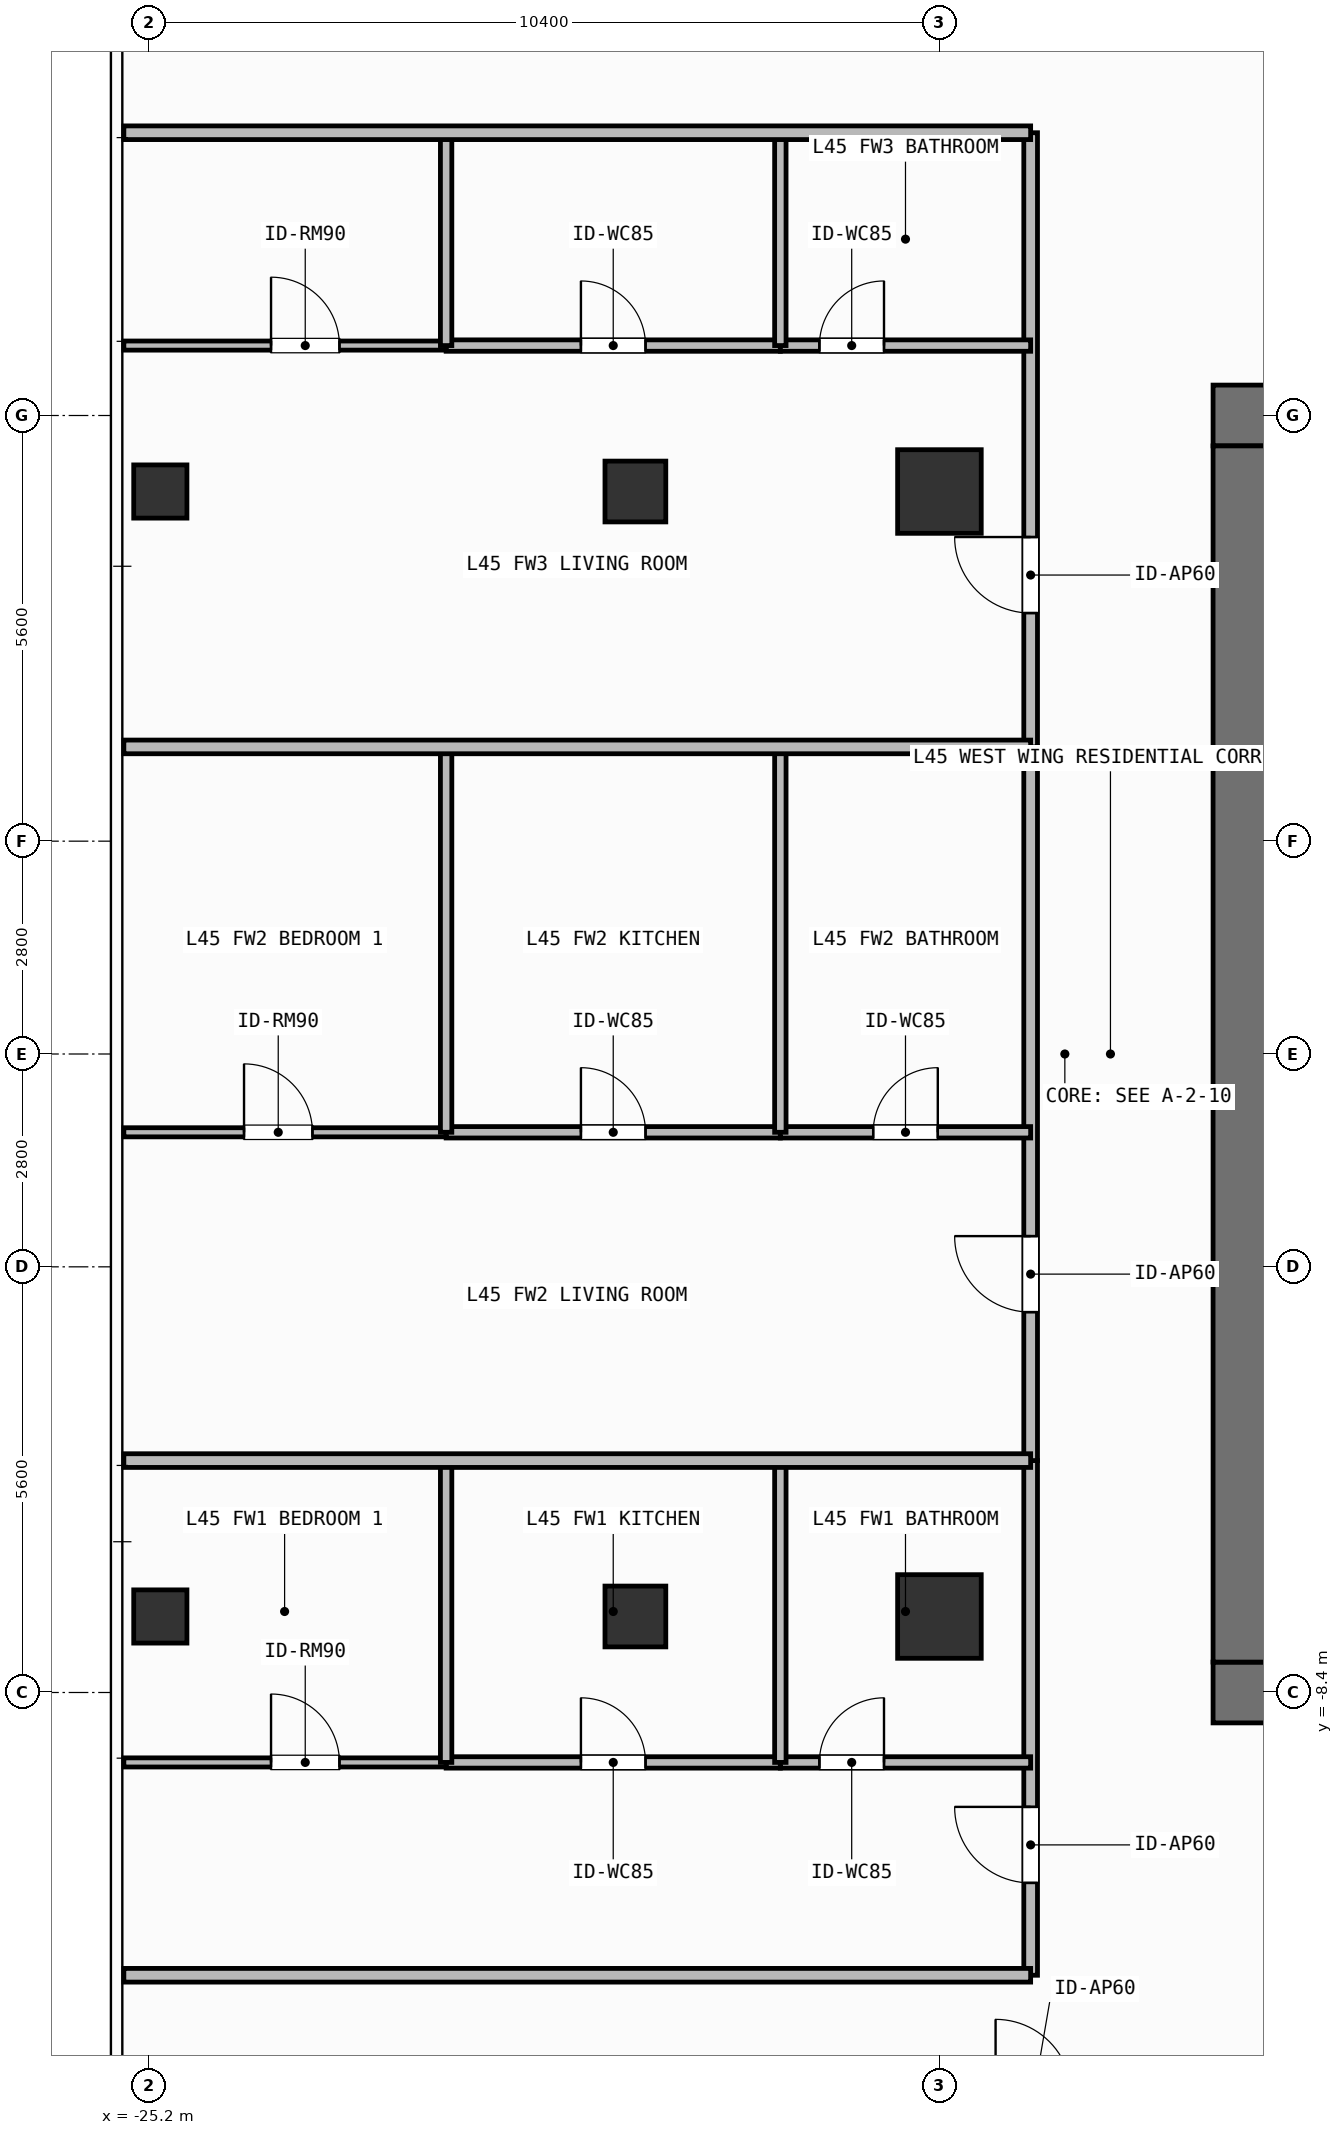
"""IFC4 building model, lengths in metres.
Left out: names, types, materials, properties, quantities, classifications, styles, units other than length and angle.
Written with IfcOpenShell. Run it as: python <this file> out.ifc"""

import sys

from ifc_helpers import new_model, si_unit, direction, frame, frame_2d, origin, origin_2d, place, context, subcontext, project, spatial, rectangle, hollow_rectangle, extrude, element, fill, save


model = new_model("IFC4")
c1 = context("Model", 3, precision=1e-05, world=origin(), true_north=direction((0.0, 1.0)))
c2 = subcontext(c1, "Body", "Model", "MODEL_VIEW")
j1 = project(units=[si_unit("LENGTHUNIT", "METRE"), si_unit("PLANEANGLEUNIT", "RADIAN")], contexts=[c1])
p1 = place(None, origin())
s1 = spatial("IfcSite", under=j1, at=p1, CompositionType="ELEMENT")
p2 = place(p1, origin())
s2 = spatial("IfcBuilding", under=s1, at=p2, CompositionType="ELEMENT")
p3 = place(p2, frame((0.0, 0.0, 183.6)))
s3 = spatial("IfcBuildingStorey", under=s2, at=p3, CompositionType="ELEMENT", Elevation=183.6)
for number, where, z_axis, x_axis in (
    (1, (-11.2, -8.4, 0.0), (0.0, 0.0, 1.0), (1.0, 0.0, 0.0)),
    (2, (-11.2, 8.4, 0.0), (0.0, 0.0, 1.0), (1.0, 0.0, 0.0)),
):
    element("IfcWall", number, at=place(p3, frame(where, z_axis=z_axis, x_axis=x_axis)), inside=s3, PredefinedType="SHEAR", context=c2, shape_type="SweptSolid", body=[
        extrude(rectangle(XDim=1.5, YDim=0.8, at=frame_2d((0.75, 0.0))), origin(), (0.0, 0.0, 1.0), 3.9),
    ])
p4 = place(p3, frame((-10.8, -8.0, 0.0), z_axis=(0.0, 0.0, 1.0), x_axis=(0.0, 1.0, 0.0)))
e3 = element("IfcWall", 3, at=p4, inside=s3, PredefinedType="SHEAR", context=c2, shape_type="SweptSolid", body=[
    extrude(rectangle(XDim=16.0, YDim=0.8, at=frame_2d((8.0, 0.0))), origin(), (0.0, 0.0, 1.0), 3.9),
])
for number, where, z_axis, x_axis in (
    (4, (-14.8, -7.4, 0.0), (0.0, 0.0, 1.0), (1.0, 0.0, 0.0)),
    (5, (-14.8, 7.4, 0.0), (0.0, 0.0, 1.0), (1.0, 0.0, 0.0)),
):
    element("IfcColumn", number, at=place(p3, frame(where, z_axis=z_axis, x_axis=x_axis)), inside=s3, PredefinedType="COLUMN", context=c2, shape_type="SweptSolid", body=[
        extrude(rectangle(XDim=1.1, YDim=1.1, at=origin_2d()), origin(), (0.0, 0.0, 1.0), 3.9),
    ])
for number, where, z_axis, x_axis in (
    (6, (-18.8, -7.4, 0.0), (0.0, 0.0, 1.0), (1.0, 0.0, 0.0)),
    (7, (-18.8, 7.4, 0.0), (0.0, 0.0, 1.0), (1.0, 0.0, 0.0)),
):
    element("IfcColumn", number, at=place(p3, frame(where, z_axis=z_axis, x_axis=x_axis)), inside=s3, PredefinedType="COLUMN", context=c2, shape_type="SweptSolid", body=[
        extrude(hollow_rectangle(XDim=0.8, YDim=0.8, WallThickness=0.036, at=origin_2d()), origin(), (0.0, 0.0, 1.0), 3.9),
    ])
for number, where, z_axis, x_axis in (
    (8, (-25.05, -7.4, 0.0), (0.0, 0.0, 1.0), (1.0, 0.0, 0.0)),
    (9, (-25.05, 7.4, 0.0), (0.0, 0.0, 1.0), (1.0, 0.0, 0.0)),
):
    element("IfcColumn", number, at=place(p3, frame(where, z_axis=z_axis, x_axis=x_axis)), inside=s3, PredefinedType="COLUMN", context=c2, shape_type="SweptSolid", body=[
        extrude(hollow_rectangle(XDim=0.7, YDim=0.7, WallThickness=0.032, at=origin_2d()), origin(), (0.0, 0.0, 1.0), 3.9),
    ])
p5 = place(p3, frame((-13.6, -12.12, 0.0), z_axis=(0.0, 0.0, 1.0), x_axis=(0.0, 1.0, 0.0)))
e10 = element("IfcWall", 10, at=p5, inside=s3, PredefinedType="PARTITIONING", context=c2, shape_type="SweptSolid", body=[
    extrude(rectangle(XDim=6.771, YDim=0.18, at=frame_2d((3.385, 0.0))), origin(), (0.0, 0.0, 1.0), 3.68),
])
p6 = place(p5, frame((1.215, 0.0, 0.0)))
e11 = element("IfcOpeningElement", 11, at=p6, cuts=e10, PredefinedType="OPENING", context=c2, shape_type="SweptSolid", body=[
    extrude(rectangle(XDim=1.0, YDim=2.2, at=frame_2d((0.5, 1.1))), frame((0.0, 0.1, 0.0), z_axis=(0.0, -1.0, 0.0), x_axis=(1.0, 0.0, 0.0)), (0.0, 0.0, 1.0), 0.2),
])
p7 = place(p3, frame((-21.29, -9.32, 0.0), z_axis=(0.0, 0.0, 1.0), x_axis=(1.0, 0.0, 0.0)))
e12 = element("IfcWall", 12, at=p7, inside=s3, PredefinedType="PARTITIONING", context=c2, shape_type="SweptSolid", body=[
    extrude(rectangle(XDim=4.397, YDim=0.15, at=frame_2d((2.198, 0.0))), origin(), (0.0, 0.0, 1.0), 3.68),
])
p8 = place(p7, frame((1.773, 0.0, 0.0)))
e13 = element("IfcOpeningElement", 13, at=p8, cuts=e12, PredefinedType="OPENING", context=c2, shape_type="SweptSolid", body=[
    extrude(rectangle(XDim=0.85, YDim=2.1, at=frame_2d((0.425, 1.05))), frame((0.0, 0.085, 0.0), z_axis=(0.0, -1.0, 0.0), x_axis=(1.0, 0.0, 0.0)), (0.0, 0.0, 1.0), 0.17),
])
p9 = place(p3, frame((-16.893, -9.32, 0.0), z_axis=(0.0, 0.0, 1.0), x_axis=(1.0, 0.0, 0.0)))
e14 = element("IfcWall", 14, at=p9, inside=s3, PredefinedType="PARTITIONING", context=c2, shape_type="SweptSolid", body=[
    extrude(rectangle(XDim=3.293, YDim=0.15, at=frame_2d((1.646, 0.0))), origin(), (0.0, 0.0, 1.0), 3.68),
])
p10 = place(p9, frame((0.514, 0.0, 0.0)))
e15 = element("IfcOpeningElement", 15, at=p10, cuts=e14, PredefinedType="OPENING", context=c2, shape_type="SweptSolid", body=[
    extrude(rectangle(XDim=0.85, YDim=2.1, at=frame_2d((0.425, 1.05))), frame((0.0, 0.085, 0.0), z_axis=(0.0, -1.0, 0.0), x_axis=(1.0, 0.0, 0.0)), (0.0, 0.0, 1.0), 0.17),
])
p11 = place(p3, frame((-25.53, -9.32, 0.0), z_axis=(0.0, 0.0, 1.0), x_axis=(1.0, 0.0, 0.0)))
e16 = element("IfcWall", 16, at=p11, inside=s3, PredefinedType="PARTITIONING", context=c2, shape_type="SweptSolid", body=[
    extrude(rectangle(XDim=4.24, YDim=0.12, at=frame_2d((2.12, 0.0))), origin(), (0.0, 0.0, 1.0), 3.68),
])
p12 = place(p11, frame((1.937, 0.0, 0.0)))
e17 = element("IfcOpeningElement", 17, at=p12, cuts=e16, PredefinedType="OPENING", context=c2, shape_type="SweptSolid", body=[
    extrude(rectangle(XDim=0.9, YDim=2.1, at=frame_2d((0.45, 1.05))), frame((0.0, 0.07, 0.0), z_axis=(0.0, -1.0, 0.0), x_axis=(1.0, 0.0, 0.0)), (0.0, 0.0, 1.0), 0.14),
])
p13 = place(p3, frame((-13.6, -5.349, 0.0), z_axis=(0.0, 0.0, 1.0), x_axis=(0.0, 1.0, 0.0)))
e18 = element("IfcWall", 18, at=p13, inside=s3, PredefinedType="PARTITIONING", context=c2, shape_type="SweptSolid", body=[
    extrude(rectangle(XDim=9.389, YDim=0.18, at=frame_2d((4.695, 0.0))), origin(), (0.0, 0.0, 1.0), 3.68),
])
p14 = place(p13, frame((1.953, 0.0, 0.0)))
e19 = element("IfcOpeningElement", 19, at=p14, cuts=e18, PredefinedType="OPENING", context=c2, shape_type="SweptSolid", body=[
    extrude(rectangle(XDim=1.0, YDim=2.2, at=frame_2d((0.5, 1.1))), frame((0.0, 0.1, 0.0), z_axis=(0.0, -1.0, 0.0), x_axis=(1.0, 0.0, 0.0)), (0.0, 0.0, 1.0), 0.2),
])
p15 = place(p3, frame((-21.29, -1.03, 0.0), z_axis=(0.0, 0.0, 1.0), x_axis=(1.0, 0.0, 0.0)))
e20 = element("IfcWall", 20, at=p15, inside=s3, PredefinedType="PARTITIONING", context=c2, shape_type="SweptSolid", body=[
    extrude(rectangle(XDim=4.397, YDim=0.15, at=frame_2d((2.198, 0.0))), origin(), (0.0, 0.0, 1.0), 3.68),
])
p16 = place(p15, frame((1.773, 0.0, 0.0)))
e21 = element("IfcOpeningElement", 21, at=p16, cuts=e20, PredefinedType="OPENING", context=c2, shape_type="SweptSolid", body=[
    extrude(rectangle(XDim=0.85, YDim=2.1, at=frame_2d((0.425, 1.05))), frame((0.0, 0.085, 0.0), z_axis=(0.0, -1.0, 0.0), x_axis=(1.0, 0.0, 0.0)), (0.0, 0.0, 1.0), 0.17),
])
p17 = place(p3, frame((-16.893, -1.03, 0.0), z_axis=(0.0, 0.0, 1.0), x_axis=(1.0, 0.0, 0.0)))
e22 = element("IfcWall", 22, at=p17, inside=s3, PredefinedType="PARTITIONING", context=c2, shape_type="SweptSolid", body=[
    extrude(rectangle(XDim=3.293, YDim=0.15, at=frame_2d((1.646, 0.0))), origin(), (0.0, 0.0, 1.0), 3.68),
])
p18 = place(p17, frame((1.221, 0.0, 0.0)))
e23 = element("IfcOpeningElement", 23, at=p18, cuts=e22, PredefinedType="OPENING", context=c2, shape_type="SweptSolid", body=[
    extrude(rectangle(XDim=0.85, YDim=2.1, at=frame_2d((0.425, 1.05))), frame((0.0, 0.085, 0.0), z_axis=(0.0, -1.0, 0.0), x_axis=(1.0, 0.0, 0.0)), (0.0, 0.0, 1.0), 0.17),
])
p19 = place(p3, frame((-25.53, -1.03, 0.0), z_axis=(0.0, 0.0, 1.0), x_axis=(1.0, 0.0, 0.0)))
e24 = element("IfcWall", 24, at=p19, inside=s3, PredefinedType="PARTITIONING", context=c2, shape_type="SweptSolid", body=[
    extrude(rectangle(XDim=4.24, YDim=0.12, at=frame_2d((2.12, 0.0))), origin(), (0.0, 0.0, 1.0), 3.68),
])
p20 = place(p19, frame((1.581, 0.0, 0.0)))
e25 = element("IfcOpeningElement", 25, at=p20, cuts=e24, PredefinedType="OPENING", context=c2, shape_type="SweptSolid", body=[
    extrude(rectangle(XDim=0.9, YDim=2.1, at=frame_2d((0.45, 1.05))), frame((0.0, 0.07, 0.0), z_axis=(0.0, -1.0, 0.0), x_axis=(1.0, 0.0, 0.0)), (0.0, 0.0, 1.0), 0.14),
])
p21 = place(p3, frame((-13.6, 4.04, 0.0), z_axis=(0.0, 0.0, 1.0), x_axis=(0.0, 1.0, 0.0)))
e26 = element("IfcWall", 26, at=p21, inside=s3, PredefinedType="PARTITIONING", context=c2, shape_type="SweptSolid", body=[
    extrude(rectangle(XDim=8.08, YDim=0.18, at=frame_2d((4.04, 0.0))), origin(), (0.0, 0.0, 1.0), 3.68),
])
p22 = place(p21, frame((1.761, 0.0, 0.0)))
e27 = element("IfcOpeningElement", 27, at=p22, cuts=e26, PredefinedType="OPENING", context=c2, shape_type="SweptSolid", body=[
    extrude(rectangle(XDim=1.0, YDim=2.2, at=frame_2d((0.5, 1.1))), frame((0.0, 0.1, 0.0), z_axis=(0.0, -1.0, 0.0), x_axis=(1.0, 0.0, 0.0)), (0.0, 0.0, 1.0), 0.2),
])
p23 = place(p3, frame((-21.29, 9.32, 0.0), z_axis=(0.0, 0.0, 1.0), x_axis=(1.0, 0.0, 0.0)))
e28 = element("IfcWall", 28, at=p23, inside=s3, PredefinedType="PARTITIONING", context=c2, shape_type="SweptSolid", body=[
    extrude(rectangle(XDim=4.397, YDim=0.15, at=frame_2d((2.198, 0.0))), origin(), (0.0, 0.0, 1.0), 3.68),
])
p24 = place(p23, frame((1.773, 0.0, 0.0)))
e29 = element("IfcOpeningElement", 29, at=p24, cuts=e28, PredefinedType="OPENING", context=c2, shape_type="SweptSolid", body=[
    extrude(rectangle(XDim=0.85, YDim=2.1, at=frame_2d((0.425, 1.05))), frame((0.0, 0.085, 0.0), z_axis=(0.0, -1.0, 0.0), x_axis=(1.0, 0.0, 0.0)), (0.0, 0.0, 1.0), 0.17),
])
p25 = place(p3, frame((-16.893, 9.32, 0.0), z_axis=(0.0, 0.0, 1.0), x_axis=(1.0, 0.0, 0.0)))
e30 = element("IfcWall", 30, at=p25, inside=s3, PredefinedType="PARTITIONING", context=c2, shape_type="SweptSolid", body=[
    extrude(rectangle(XDim=3.293, YDim=0.15, at=frame_2d((1.646, 0.0))), origin(), (0.0, 0.0, 1.0), 3.68),
])
p26 = place(p25, frame((0.514, 0.0, 0.0)))
e31 = element("IfcOpeningElement", 31, at=p26, cuts=e30, PredefinedType="OPENING", context=c2, shape_type="SweptSolid", body=[
    extrude(rectangle(XDim=0.85, YDim=2.1, at=frame_2d((0.425, 1.05))), frame((0.0, 0.085, 0.0), z_axis=(0.0, -1.0, 0.0), x_axis=(1.0, 0.0, 0.0)), (0.0, 0.0, 1.0), 0.17),
])
p27 = place(p3, frame((-25.53, 9.32, 0.0), z_axis=(0.0, 0.0, 1.0), x_axis=(1.0, 0.0, 0.0)))
e32 = element("IfcWall", 32, at=p27, inside=s3, PredefinedType="PARTITIONING", context=c2, shape_type="SweptSolid", body=[
    extrude(rectangle(XDim=4.24, YDim=0.12, at=frame_2d((2.12, 0.0))), origin(), (0.0, 0.0, 1.0), 3.68),
])
p28 = place(p27, frame((1.937, 0.0, 0.0)))
e33 = element("IfcOpeningElement", 33, at=p28, cuts=e32, PredefinedType="OPENING", context=c2, shape_type="SweptSolid", body=[
    extrude(rectangle(XDim=0.9, YDim=2.1, at=frame_2d((0.45, 1.05))), frame((0.0, 0.07, 0.0), z_axis=(0.0, -1.0, 0.0), x_axis=(1.0, 0.0, 0.0)), (0.0, 0.0, 1.0), 0.14),
])
for number, where, z_axis, x_axis in (
    (34, (-16.893, -9.32, 0.0), (0.0, 0.0, 1.0), (0.0, 1.0, 0.0)),
    (35, (-21.29, -9.32, 0.0), (0.0, 0.0, 1.0), (0.0, 1.0, 0.0)),
):
    element("IfcWall", number, at=place(p3, frame(where, z_axis=z_axis, x_axis=x_axis)), inside=s3, PredefinedType="PARTITIONING", context=c2, shape_type="SweptSolid", body=[
        extrude(rectangle(XDim=3.971, YDim=0.15, at=frame_2d((1.985, 0.0))), origin(), (0.0, 0.0, 1.0), 3.68),
    ])
for number, where, z_axis, x_axis in (
    (36, (-16.893, -1.03, 0.0), (0.0, 0.0, 1.0), (0.0, 1.0, 0.0)),
    (37, (-21.29, -1.03, 0.0), (0.0, 0.0, 1.0), (0.0, 1.0, 0.0)),
):
    element("IfcWall", number, at=place(p3, frame(where, z_axis=z_axis, x_axis=x_axis)), inside=s3, PredefinedType="PARTITIONING", context=c2, shape_type="SweptSolid", body=[
        extrude(rectangle(XDim=5.07, YDim=0.15, at=frame_2d((2.535, 0.0))), origin(), (0.0, 0.0, 1.0), 3.68),
    ])
p29 = place(p3, frame((-25.53, -5.349, 0.0), z_axis=(0.0, 0.0, 1.0), x_axis=(1.0, 0.0, 0.0)))
e38 = element("IfcWall", 38, at=p29, inside=s3, PredefinedType="PARTITIONING", context=c2, shape_type="SweptSolid", body=[
    extrude(rectangle(XDim=11.93, YDim=0.18, at=frame_2d((5.965, 0.0))), origin(), (0.0, 0.0, 1.0), 3.68),
])
for number, where, z_axis, x_axis in (
    (39, (-16.893, 9.32, 0.0), (0.0, 0.0, 1.0), (0.0, 1.0, 0.0)),
    (40, (-21.29, 9.32, 0.0), (0.0, 0.0, 1.0), (0.0, 1.0, 0.0)),
):
    element("IfcWall", number, at=place(p3, frame(where, z_axis=z_axis, x_axis=x_axis)), inside=s3, PredefinedType="PARTITIONING", context=c2, shape_type="SweptSolid", body=[
        extrude(rectangle(XDim=2.8, YDim=0.15, at=frame_2d((1.4, 0.0))), origin(), (0.0, 0.0, 1.0), 3.68),
    ])
for number, where, z_axis, x_axis in (
    (41, (-25.53, 4.04, 0.0), (0.0, 0.0, 1.0), (1.0, 0.0, 0.0)),
    (42, (-25.53, -12.12, 0.0), (0.0, 0.0, 1.0), (1.0, 0.0, 0.0)),
    (43, (-25.53, 12.12, 0.0), (0.0, 0.0, 1.0), (1.0, 0.0, 0.0)),
):
    element("IfcWall", number, at=place(p3, frame(where, z_axis=z_axis, x_axis=x_axis)), inside=s3, PredefinedType="PARTITIONING", context=c2, shape_type="SweptSolid", body=[
        extrude(rectangle(XDim=11.93, YDim=0.18, at=frame_2d((5.965, 0.0))), origin(), (0.0, 0.0, 1.0), 3.68),
    ])
p30 = place(p6, origin())
e44 = element("IfcDoor", 44, at=p30, inside=s3, OperationType="SINGLE_SWING_RIGHT", PredefinedType="DOOR", context=c2, shape_type="SweptSolid", body=[
    extrude(rectangle(XDim=1.0, YDim=2.2, at=frame_2d((0.5, 1.1))), frame((0.0, 0.025, 0.0), z_axis=(0.0, -1.0, 0.0), x_axis=(1.0, 0.0, 0.0)), (0.0, 0.0, 1.0), 0.05),
])
fill(e11, e44)
p31 = place(p8, origin())
e45 = element("IfcDoor", 45, at=p31, inside=s3, OperationType="SINGLE_SWING_LEFT", PredefinedType="DOOR", context=c2, shape_type="SweptSolid", body=[
    extrude(rectangle(XDim=0.85, YDim=2.1, at=frame_2d((0.425, 1.05))), frame((0.0, 0.025, 0.0), z_axis=(0.0, -1.0, 0.0), x_axis=(1.0, 0.0, 0.0)), (0.0, 0.0, 1.0), 0.05),
])
fill(e13, e45)
p32 = place(p10, origin())
e46 = element("IfcDoor", 46, at=p32, inside=s3, OperationType="SINGLE_SWING_RIGHT", PredefinedType="DOOR", context=c2, shape_type="SweptSolid", body=[
    extrude(rectangle(XDim=0.85, YDim=2.1, at=frame_2d((0.425, 1.05))), frame((0.0, 0.025, 0.0), z_axis=(0.0, -1.0, 0.0), x_axis=(1.0, 0.0, 0.0)), (0.0, 0.0, 1.0), 0.05),
])
fill(e15, e46)
p33 = place(p12, origin())
e47 = element("IfcDoor", 47, at=p33, inside=s3, OperationType="SINGLE_SWING_LEFT", PredefinedType="DOOR", context=c2, shape_type="SweptSolid", body=[
    extrude(rectangle(XDim=0.9, YDim=2.1, at=frame_2d((0.45, 1.05))), frame((0.0, 0.025, 0.0), z_axis=(0.0, -1.0, 0.0), x_axis=(1.0, 0.0, 0.0)), (0.0, 0.0, 1.0), 0.05),
])
fill(e17, e47)
p34 = place(p14, origin())
e48 = element("IfcDoor", 48, at=p34, inside=s3, OperationType="SINGLE_SWING_RIGHT", PredefinedType="DOOR", context=c2, shape_type="SweptSolid", body=[
    extrude(rectangle(XDim=1.0, YDim=2.2, at=frame_2d((0.5, 1.1))), frame((0.0, 0.025, 0.0), z_axis=(0.0, -1.0, 0.0), x_axis=(1.0, 0.0, 0.0)), (0.0, 0.0, 1.0), 0.05),
])
fill(e19, e48)
p35 = place(p16, origin())
e49 = element("IfcDoor", 49, at=p35, inside=s3, OperationType="SINGLE_SWING_LEFT", PredefinedType="DOOR", context=c2, shape_type="SweptSolid", body=[
    extrude(rectangle(XDim=0.85, YDim=2.1, at=frame_2d((0.425, 1.05))), frame((0.0, 0.025, 0.0), z_axis=(0.0, -1.0, 0.0), x_axis=(1.0, 0.0, 0.0)), (0.0, 0.0, 1.0), 0.05),
])
fill(e21, e49)
p36 = place(p18, origin())
e50 = element("IfcDoor", 50, at=p36, inside=s3, OperationType="SINGLE_SWING_RIGHT", PredefinedType="DOOR", context=c2, shape_type="SweptSolid", body=[
    extrude(rectangle(XDim=0.85, YDim=2.1, at=frame_2d((0.425, 1.05))), frame((0.0, 0.025, 0.0), z_axis=(0.0, -1.0, 0.0), x_axis=(1.0, 0.0, 0.0)), (0.0, 0.0, 1.0), 0.05),
])
fill(e23, e50)
p37 = place(p20, origin())
e51 = element("IfcDoor", 51, at=p37, inside=s3, OperationType="SINGLE_SWING_LEFT", PredefinedType="DOOR", context=c2, shape_type="SweptSolid", body=[
    extrude(rectangle(XDim=0.9, YDim=2.1, at=frame_2d((0.45, 1.05))), frame((0.0, 0.025, 0.0), z_axis=(0.0, -1.0, 0.0), x_axis=(1.0, 0.0, 0.0)), (0.0, 0.0, 1.0), 0.05),
])
fill(e25, e51)
p38 = place(p22, origin())
e52 = element("IfcDoor", 52, at=p38, inside=s3, OperationType="SINGLE_SWING_RIGHT", PredefinedType="DOOR", context=c2, shape_type="SweptSolid", body=[
    extrude(rectangle(XDim=1.0, YDim=2.2, at=frame_2d((0.5, 1.1))), frame((0.0, 0.025, 0.0), z_axis=(0.0, -1.0, 0.0), x_axis=(1.0, 0.0, 0.0)), (0.0, 0.0, 1.0), 0.05),
])
fill(e27, e52)
p39 = place(p24, origin())
e53 = element("IfcDoor", 53, at=p39, inside=s3, OperationType="SINGLE_SWING_LEFT", PredefinedType="DOOR", context=c2, shape_type="SweptSolid", body=[
    extrude(rectangle(XDim=0.85, YDim=2.1, at=frame_2d((0.425, 1.05))), frame((0.0, 0.025, 0.0), z_axis=(0.0, -1.0, 0.0), x_axis=(1.0, 0.0, 0.0)), (0.0, 0.0, 1.0), 0.05),
])
fill(e29, e53)
p40 = place(p26, origin())
e54 = element("IfcDoor", 54, at=p40, inside=s3, OperationType="SINGLE_SWING_RIGHT", PredefinedType="DOOR", context=c2, shape_type="SweptSolid", body=[
    extrude(rectangle(XDim=0.85, YDim=2.1, at=frame_2d((0.425, 1.05))), frame((0.0, 0.025, 0.0), z_axis=(0.0, -1.0, 0.0), x_axis=(1.0, 0.0, 0.0)), (0.0, 0.0, 1.0), 0.05),
])
fill(e31, e54)
p41 = place(p28, origin())
e55 = element("IfcDoor", 55, at=p41, inside=s3, OperationType="SINGLE_SWING_LEFT", PredefinedType="DOOR", context=c2, shape_type="SweptSolid", body=[
    extrude(rectangle(XDim=0.9, YDim=2.1, at=frame_2d((0.45, 1.05))), frame((0.0, 0.025, 0.0), z_axis=(0.0, -1.0, 0.0), x_axis=(1.0, 0.0, 0.0)), (0.0, 0.0, 1.0), 0.05),
])
fill(e33, e55)
save(model, sys.argv[1])
